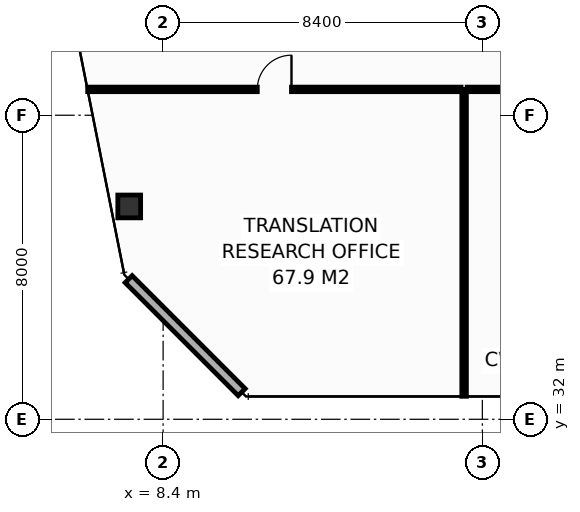
"""IFC4 building model, lengths in metres.
Left out: names, types, materials, properties, quantities, classifications, styles, units other than length and angle.
Written with IfcOpenShell. Run it as: python <this file> out.ifc"""

import sys

from ifc_helpers import new_model, si_unit, direction, frame, frame_2d, origin, origin_2d, place, context, subcontext, project, spatial, rectangle, hollow_rectangle, extrude, element, fill, save


model = new_model("IFC4")
c1 = context("Model", 3, precision=1e-05, world=origin(), true_north=direction((0.0, 1.0)))
c2 = subcontext(c1, "Body", "Model", "MODEL_VIEW")
j1 = project(units=[si_unit("LENGTHUNIT", "METRE"), si_unit("PLANEANGLEUNIT", "RADIAN")], contexts=[c1])
p1 = place(None, origin())
s1 = spatial("IfcSite", under=j1, at=p1, CompositionType="ELEMENT")
p2 = place(p1, origin())
s2 = spatial("IfcBuilding", under=s1, at=p2, CompositionType="ELEMENT")
p3 = place(p2, frame((0.0, 0.0, 302.8)))
s3 = spatial("IfcBuildingStorey", under=s2, at=p3, CompositionType="ELEMENT", Elevation=302.8)
p4 = place(p3, frame((7.508, 37.6, 0.0), z_axis=(0.0, 0.0, 1.0), x_axis=(1.0, 0.0, 0.0)))
e1 = element("IfcColumn", 1, at=p4, inside=s3, PredefinedType="COLUMN", context=c2, shape_type="SweptSolid", body=[
    extrude(hollow_rectangle(XDim=0.6, YDim=0.6, WallThickness=0.028, at=origin_2d()), origin(), (0.0, 0.0, 1.0), 3.8),
])
p5 = place(p3, frame((7.493, 35.687, 0.0), z_axis=(0.0, 0.0, 1.0), x_axis=(0.70707775441, -0.707135806771, 0.0)))
e2 = element("IfcWall", 2, at=p5, inside=s3, PredefinedType="STANDARD", context=c2, shape_type="SweptSolid", body=[
    extrude(rectangle(XDim=4.206, YDim=0.26, at=frame_2d((2.103, 0.0))), origin(), (0.0, 0.0, 1.0), 3.55),
])
p6 = place(p3, frame((16.32, 32.605, 0.0), z_axis=(0.0, 0.0, 1.0), x_axis=(0.0, 1.0, 0.0)))
e3 = element("IfcWall", 3, at=p6, inside=s3, PredefinedType="PARTITIONING", context=c2, shape_type="SweptSolid", body=[
    extrude(rectangle(XDim=8.075, YDim=0.12, at=frame_2d((4.038, 0.0))), origin(), (0.0, 0.0, 1.0), 3.047),
])
p7 = place(p3, frame((6.415, 40.68, 0.0), z_axis=(0.0, 0.0, 1.0), x_axis=(1.0, 0.0, 0.0)))
e4 = element("IfcWall", 4, at=p7, inside=s3, PredefinedType="PARTITIONING", context=c2, shape_type="SweptSolid", body=[
    extrude(rectangle(XDim=9.825, YDim=0.12, at=frame_2d((4.913, 0.0))), origin(), (0.0, 0.0, 1.0), 3.085),
])
p8 = place(p7, frame((4.463, 0.0, 0.0)))
e5 = element("IfcOpeningElement", 5, at=p8, cuts=e4, PredefinedType="OPENING", context=c2, shape_type="SweptSolid", body=[
    extrude(rectangle(XDim=0.9, YDim=2.1, at=frame_2d((0.45, 1.05))), frame((0.0, 0.07, 0.0), z_axis=(0.0, -1.0, 0.0), x_axis=(1.0, 0.0, 0.0)), (0.0, 0.0, 1.0), 0.14),
])
p9 = place(p3, frame((16.4, 40.68, 0.0), z_axis=(0.0, 0.0, 1.0), x_axis=(1.0, 0.0, 0.0)))
e6 = element("IfcWall", 6, at=p9, inside=s3, PredefinedType="PARTITIONING", context=c2, shape_type="SweptSolid", body=[
    extrude(rectangle(XDim=11.623, YDim=0.12, at=frame_2d((5.811, 0.0))), origin(), (0.0, 0.0, 1.0), 3.047),
])
p10 = place(p9, frame((5.361, 0.0, 0.0)))
e7 = element("IfcOpeningElement", 7, at=p10, cuts=e6, PredefinedType="OPENING", context=c2, shape_type="SweptSolid", body=[
    extrude(rectangle(XDim=0.9, YDim=2.1, at=frame_2d((0.45, 1.05))), frame((0.0, 0.07, 0.0), z_axis=(0.0, -1.0, 0.0), x_axis=(1.0, 0.0, 0.0)), (0.0, 0.0, 1.0), 0.14),
])
p11 = place(p8, origin())
e8 = element("IfcDoor", 8, at=p11, inside=s3, OperationType="SINGLE_SWING_RIGHT", PredefinedType="DOOR", context=c2, shape_type="SweptSolid", body=[
    extrude(rectangle(XDim=0.9, YDim=2.1, at=frame_2d((0.45, 1.05))), frame((0.0, 0.025, 0.0), z_axis=(0.0, -1.0, 0.0), x_axis=(1.0, 0.0, 0.0)), (0.0, 0.0, 1.0), 0.05),
])
fill(e5, e8)
save(model, sys.argv[1])
